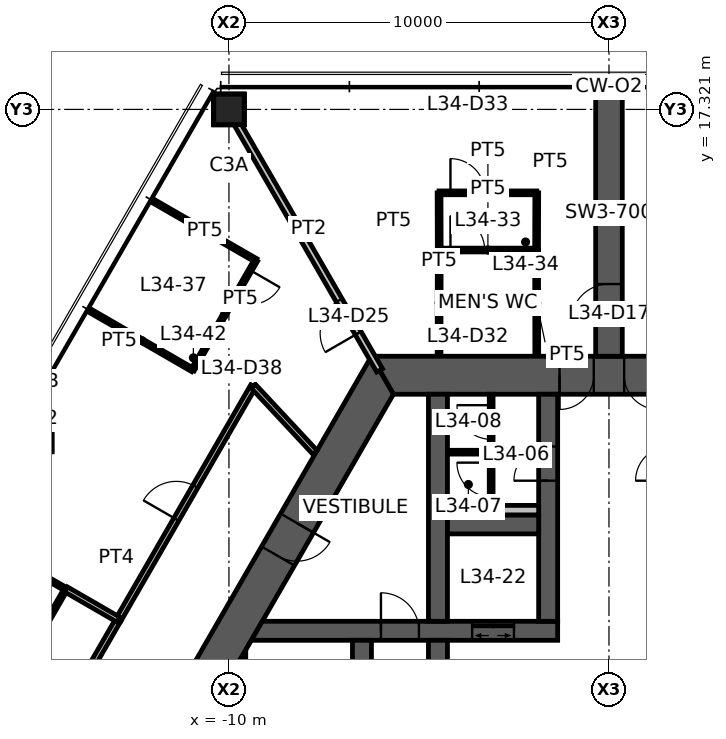
"""IFC4 building model, lengths in metres.
Left out: names, types, materials, properties, quantities, classifications, styles, units other than length and angle.
Written with IfcOpenShell. Run it as: python <this file> out.ifc"""

import sys

from ifc_helpers import new_model, si_unit, direction, frame, frame_2d, origin, origin_2d, place, context, subcontext, project, spatial, polyline, rectangle, hollow_rectangle, outline, extrude, element, fill, save


model = new_model("IFC4")
c1 = context("Model", 3, precision=1e-05, world=origin(), true_north=direction((0.0, 1.0)))
c2 = subcontext(c1, "Body", "Model", "MODEL_VIEW")
j1 = project(units=[si_unit("LENGTHUNIT", "METRE"), si_unit("PLANEANGLEUNIT", "RADIAN")], contexts=[c1])
p1 = place(None, origin())
s1 = spatial("IfcSite", under=j1, at=p1, CompositionType="ELEMENT")
p2 = place(p1, origin())
s2 = spatial("IfcBuilding", under=s1, at=p2, CompositionType="ELEMENT")
p3 = place(p2, frame((0.0, 0.0, 137.0)))
s3 = spatial("IfcBuildingStorey", under=s2, at=p3, CompositionType="ELEMENT", Elevation=137.0)
p4 = place(p3, frame((-10.0, 17.321, 0.0), z_axis=(0.0, 0.0, 1.0), x_axis=(1.0, 0.0, 0.0)))
e1 = element("IfcColumn", 1, at=p4, inside=s3, PredefinedType="COLUMN", context=c2, shape_type="SweptSolid", body=[
    extrude(hollow_rectangle(XDim=0.8, YDim=0.8, WallThickness=0.045, at=origin_2d()), origin(), (0.0, 0.0, 1.0), 3.9),
])
p5 = place(p3, frame((5.961, 10.325, 0.0), z_axis=(0.0, 0.0, 1.0), x_axis=(-1.0, 0.0, 0.0)))
e2 = element("IfcWall", 2, at=p5, inside=s3, PredefinedType="SHEAR", context=c2, shape_type="SweptSolid", body=[
    extrude(outline(polyline([(-0.289, -0.5), (4.661, -0.5), (5.561, -0.5), (6.361, -0.5), (7.261, -0.5), (12.211, -0.5), (11.634, 0.5), (7.261, 0.5), (6.361, 0.5), (5.561, 0.5), (4.661, 0.5), (0.289, 0.5), (-0.289, -0.5)])), origin(), (0.0, 0.0, 1.0), 3.9),
])
p6 = place(p5, frame((6.361, 0.0, 0.0)))
e3 = element("IfcOpeningElement", 3, at=p6, cuts=e2, PredefinedType="OPENING", context=c2, shape_type="SweptSolid", body=[
    extrude(rectangle(XDim=0.9, YDim=2.1, at=frame_2d((0.45, 1.05))), frame((0.0, 0.51, 0.0), z_axis=(0.0, -1.0, 0.0), x_axis=(1.0, 0.0, 0.0)), (0.0, 0.0, 1.0), 1.02),
])
p7 = place(p5, frame((4.661, 0.0, 0.0)))
e4 = element("IfcOpeningElement", 4, at=p7, cuts=e2, PredefinedType="OPENING", context=c2, shape_type="SweptSolid", body=[
    extrude(rectangle(XDim=0.9, YDim=2.1, at=frame_2d((0.45, 1.05))), frame((0.0, 0.51, 0.0), z_axis=(0.0, -1.0, 0.0), x_axis=(1.0, 0.0, 0.0)), (0.0, 0.0, 1.0), 1.02),
])
p8 = place(p3, frame((-5.961, 10.325, 0.0), z_axis=(0.0, 0.0, 1.0), x_axis=(-0.500004296715, -0.866022923061, 0.0)))
e5 = element("IfcWall", 5, at=p8, inside=s3, PredefinedType="SHEAR", context=c2, shape_type="SweptSolid", body=[
    extrude(outline(polyline([(-0.289, -0.5), (4.494, -0.5), (5.494, -0.5), (12.211, -0.5), (11.634, 0.5), (5.494, 0.5), (4.494, 0.5), (0.289, 0.5), (-0.289, -0.5)])), origin(), (0.0, 0.0, 1.0), 3.9),
])
p9 = place(p8, frame((4.494, 0.0, 0.0)))
e6 = element("IfcOpeningElement", 6, at=p9, cuts=e5, PredefinedType="OPENING", context=c2, shape_type="SweptSolid", body=[
    extrude(rectangle(XDim=1.0, YDim=2.1, at=frame_2d((0.5, 1.05))), frame((0.0, 0.51, 0.0), z_axis=(0.0, -1.0, 0.0), x_axis=(1.0, 0.0, 0.0)), (0.0, 0.0, 1.0), 1.02),
])
p10 = place(p3, frame((0.0, 10.825, 0.0), z_axis=(0.0, 0.0, 1.0), x_axis=(0.0, 1.0, 0.0)))
e7 = element("IfcWall", 7, at=p10, inside=s3, PredefinedType="SHEAR", context=c2, shape_type="SweptSolid", body=[
    extrude(rectangle(XDim=6.946, YDim=0.7, at=frame_2d((3.473, 0.0))), origin(), (0.0, 0.0, 1.0), 3.9),
])
p11 = place(p10, frame((0.9, 0.0, 0.0)))
e8 = element("IfcOpeningElement", 8, at=p11, cuts=e7, PredefinedType="OPENING", context=c2, shape_type="SweptSolid", body=[
    extrude(rectangle(XDim=1.0, YDim=2.1, at=frame_2d((0.5, 1.05))), frame((0.0, 0.36, 0.0), z_axis=(0.0, -1.0, 0.0), x_axis=(1.0, 0.0, 0.0)), (0.0, 0.0, 1.0), 0.72),
])
p12 = place(p3, frame((-9.266, 3.6, 0.0), z_axis=(0.0, 0.0, 1.0), x_axis=(1.0, 0.0, 0.0)))
e9 = element("IfcWall", 9, at=p12, inside=s3, PredefinedType="SHEAR", context=c2, shape_type="SweptSolid", body=[
    extrude(outline(polyline([(-0.144, -0.25), (3.266, -0.25), (4.266, -0.25), (5.667, -0.25), (6.767, -0.25), (7.916, -0.25), (7.916, 0.25), (6.767, 0.25), (5.667, 0.25), (4.266, 0.25), (3.266, 0.25), (0.144, 0.25), (-0.144, -0.25)])), origin(), (0.0, 0.0, 1.0), 3.9),
])
p13 = place(p12, frame((3.266, 0.0, 0.0)))
e10 = element("IfcOpeningElement", 10, at=p13, cuts=e9, PredefinedType="OPENING", context=c2, shape_type="SweptSolid", body=[
    extrude(rectangle(XDim=1.0, YDim=2.1, at=frame_2d((0.5, 1.05))), frame((0.0, 0.26, 0.0), z_axis=(0.0, -1.0, 0.0), x_axis=(1.0, 0.0, 0.0)), (0.0, 0.0, 1.0), 0.52),
])
p14 = place(p12, frame((5.667, 0.0, 0.0)))
e11 = element("IfcOpeningElement", 11, at=p14, cuts=e9, PredefinedType="OPENING", context=c2, shape_type="SweptSolid", body=[
    extrude(rectangle(XDim=1.1, YDim=2.1, at=frame_2d((0.55, 1.05))), frame((0.0, 0.26, 0.0), z_axis=(0.0, -1.0, 0.0), x_axis=(1.0, 0.0, 0.0)), (0.0, 0.0, 1.0), 0.52),
])
p15 = place(p3, frame((-1.6, 3.85, 0.0), z_axis=(0.0, 0.0, 1.0), x_axis=(0.0, 1.0, 0.0)))
e12 = element("IfcWall", 12, at=p15, inside=s3, PredefinedType="SHEAR", context=c2, shape_type="SweptSolid", body=[
    extrude(rectangle(XDim=5.975, YDim=0.5, at=frame_2d((2.987, 0.0))), origin(), (0.0, 0.0, 1.0), 3.9),
])
p16 = place(p15, frame((3.7, 0.0, 0.0)))
e13 = element("IfcOpeningElement", 13, at=p16, cuts=e12, PredefinedType="OPENING", context=c2, shape_type="SweptSolid", body=[
    extrude(rectangle(XDim=0.9, YDim=2.1, at=frame_2d((0.45, 1.05))), frame((0.0, 0.26, 0.0), z_axis=(0.0, -1.0, 0.0), x_axis=(1.0, 0.0, 0.0)), (0.0, 0.0, 1.0), 0.52),
])
p17 = place(p3, frame((-4.5, -3.35, 0.0), z_axis=(0.0, 0.0, 1.0), x_axis=(0.0, 1.0, 0.0)))
e14 = element("IfcWall", 14, at=p17, inside=s3, PredefinedType="SHEAR", context=c2, shape_type="SweptSolid", body=[
    extrude(rectangle(XDim=6.7, YDim=0.5, at=frame_2d((3.35, 0.0))), origin(), (0.0, 0.0, 1.0), 3.9),
])
p18 = place(p17, frame((2.85, 0.0, 0.0)))
e15 = element("IfcOpeningElement", 15, at=p18, cuts=e14, PredefinedType="OPENING", context=c2, shape_type="SweptSolid", body=[
    extrude(rectangle(XDim=1.0, YDim=2.1, at=frame_2d((0.5, 1.05))), frame((0.0, 0.26, 0.0), z_axis=(0.0, -1.0, 0.0), x_axis=(1.0, 0.0, 0.0)), (0.0, 0.0, 1.0), 0.52),
])
p19 = place(p3, frame((-6.5, -3.35, 0.0), z_axis=(0.0, 0.0, 1.0), x_axis=(0.0, 1.0, 0.0)))
e16 = element("IfcWall", 16, at=p19, inside=s3, PredefinedType="SHEAR", context=c2, shape_type="SweptSolid", body=[
    extrude(rectangle(XDim=6.7, YDim=0.5, at=frame_2d((3.35, 0.0))), origin(), (0.0, 0.0, 1.0), 3.9),
])
p20 = place(p19, frame((0.1, 0.0, 0.0)))
e17 = element("IfcOpeningElement", 17, at=p20, cuts=e16, PredefinedType="OPENING", context=c2, shape_type="SweptSolid", body=[
    extrude(rectangle(XDim=1.0, YDim=2.1, at=frame_2d((0.5, 1.05))), frame((0.0, 0.26, 0.0), z_axis=(0.0, -1.0, 0.0), x_axis=(1.0, 0.0, 0.0)), (0.0, 0.0, 1.0), 0.52),
])
p21 = place(p3, frame((-4.5, 3.85, 0.0), z_axis=(0.0, 0.0, 1.0), x_axis=(0.0, 1.0, 0.0)))
e18 = element("IfcWall", 18, at=p21, inside=s3, PredefinedType="SHEAR", context=c2, shape_type="SweptSolid", body=[
    extrude(rectangle(XDim=5.975, YDim=0.5, at=frame_2d((2.987, 0.0))), origin(), (0.0, 0.0, 1.0), 3.9),
])
p22 = place(p3, frame((-4.25, 6.4, 0.0), z_axis=(0.0, 0.0, 1.0), x_axis=(1.0, 0.0, 0.0)))
e19 = element("IfcWall", 19, at=p22, inside=s3, PredefinedType="SHEAR", context=c2, shape_type="SweptSolid", body=[
    extrude(rectangle(XDim=2.4, YDim=0.5, at=frame_2d((1.2, 0.0))), origin(), (0.0, 0.0, 1.0), 3.9),
])
p23 = place(p3, frame((-9.808, -2.662, 0.0), z_axis=(0.0, 0.0, 1.0), x_axis=(0.0, 1.0, 0.0)))
e20 = element("IfcWall", 20, at=p23, inside=s3, PredefinedType="SHEAR", context=c2, shape_type="SweptSolid", body=[
    extrude(outline(polyline([(-0.433, -0.25), (5.758, -0.25), (4.892, 0.25), (0.433, 0.25), (-0.433, -0.25)])), origin(), (0.0, 0.0, 1.0), 3.9),
])
p24 = place(p3, frame((-4.25, 6.775, 0.0), z_axis=(0.0, 0.0, 1.0), x_axis=(1.0, 0.0, 0.0)))
e21 = element("IfcWall", 21, at=p24, inside=s3, PredefinedType="PLUMBINGWALL", context=c2, shape_type="SweptSolid", body=[
    extrude(rectangle(XDim=2.4, YDim=0.25, at=frame_2d((1.2, 0.0))), origin(), (0.0, 0.0, 1.0), 3.9),
])
p25 = place(p3, frame((-3.1, 6.65, 0.0), z_axis=(0.0, 0.0, 1.0), x_axis=(0.0, 1.0, 0.0)))
e22 = element("IfcWall", 22, at=p25, inside=s3, PredefinedType="PARTITIONING", context=c2, shape_type="SweptSolid", body=[
    extrude(rectangle(XDim=3.175, YDim=0.1, at=frame_2d((1.587, 0.0))), origin(), (0.0, 0.0, 1.0), 2.95),
])
p26 = place(p25, frame((0.475, 0.0, 0.0)))
e23 = element("IfcOpeningElement", 23, at=p26, cuts=e22, PredefinedType="OPENING", context=c2, shape_type="SweptSolid", body=[
    extrude(rectangle(XDim=0.9, YDim=2.1, at=frame_2d((0.45, 1.05))), frame((0.0, 0.06, 0.0), z_axis=(0.0, -1.0, 0.0), x_axis=(1.0, 0.0, 0.0)), (0.0, 0.0, 1.0), 0.12),
])
p27 = place(p25, frame((1.988, 0.0, 0.0)))
e24 = element("IfcOpeningElement", 24, at=p27, cuts=e22, PredefinedType="OPENING", context=c2, shape_type="SweptSolid", body=[
    extrude(rectangle(XDim=0.9, YDim=2.1, at=frame_2d((0.45, 1.05))), frame((0.0, 0.06, 0.0), z_axis=(0.0, -1.0, 0.0), x_axis=(1.0, 0.0, 0.0)), (0.0, 0.0, 1.0), 0.12),
])
p28 = place(p3, frame((-3.15, 8.3, 0.0), z_axis=(0.0, 0.0, 1.0), x_axis=(-1.0, 0.0, 0.0)))
e25 = element("IfcWall", 25, at=p28, inside=s3, PredefinedType="PARTITIONING", context=c2, shape_type="SweptSolid", body=[
    extrude(rectangle(XDim=1.1, YDim=0.1, at=frame_2d((0.55, 0.0))), origin(), (0.0, 0.0, 1.0), 2.95),
])
p29 = place(p3, frame((-6.035, 10.453, 0.0), z_axis=(0.0, 0.0, 1.0), x_axis=(-0.499989830942, 0.866031274813, 0.0)))
e26 = element("IfcWall", 26, at=p29, inside=s3, PredefinedType="PARTITIONING", context=c2, shape_type="SweptSolid", body=[
    extrude(rectangle(XDim=7.93, YDim=0.175, at=frame_2d((3.965, 0.0))), origin(), (0.0, 0.0, 1.0), 3.05),
])
p30 = place(p29, frame((1.13, 0.0, 0.0)))
e27 = element("IfcOpeningElement", 27, at=p30, cuts=e26, PredefinedType="OPENING", context=c2, shape_type="SweptSolid", body=[
    extrude(rectangle(XDim=1.0, YDim=2.1, at=frame_2d((0.5, 1.05))), frame((0.0, 0.098, 0.0), z_axis=(0.0, -1.0, 0.0), x_axis=(1.0, 0.0, 0.0)), (0.0, 0.0, 1.0), 0.195),
])
p31 = place(p3, frame((-4.471, 13.62, 0.0), z_axis=(0.0, 0.0, 1.0), x_axis=(1.0, 0.0, 0.0)))
e28 = element("IfcWall", 28, at=p31, inside=s3, PredefinedType="PARTITIONING", context=c2, shape_type="SweptSolid", body=[
    extrude(rectangle(XDim=2.571, YDim=0.1, at=frame_2d((1.286, 0.0))), origin(), (0.0, 0.0, 1.0), 2.95),
])
p32 = place(p31, frame((0.3, 0.0, 0.0)))
e29 = element("IfcOpeningElement", 29, at=p32, cuts=e28, PredefinedType="OPENING", context=c2, shape_type="SweptSolid", body=[
    extrude(rectangle(XDim=0.9, YDim=2.1, at=frame_2d((0.45, 1.05))), frame((0.0, 0.06, 0.0), z_axis=(0.0, -1.0, 0.0), x_axis=(1.0, 0.0, 0.0)), (0.0, 0.0, 1.0), 0.12),
])
for number, where, z_axis, x_axis in (
    (30, (-4.471, 10.845, 0.0), (0.0, 0.0, 1.0), (0.002, 1.0, 0.0)),
    (31, (-1.905, 13.625, 0.0), (0.0, 0.0, 1.0), (0.002, -1.0, 0.0)),
):
    element("IfcWall", number, at=place(p3, frame(where, z_axis=z_axis, x_axis=x_axis)), inside=s3, PredefinedType="PARTITIONING", context=c2, shape_type="SweptSolid", body=[
        extrude(rectangle(XDim=2.78, YDim=0.1, at=frame_2d((1.39, 0.0))), origin(), (0.0, 0.0, 1.0), 2.95),
    ])
p33 = place(p3, frame((-4.471, 15.125, 0.0), z_axis=(0.0, 0.0, 1.0), x_axis=(1.0, 0.0, 0.0)))
e32 = element("IfcWall", 32, at=p33, inside=s3, PredefinedType="PARTITIONING", context=c2, shape_type="SweptSolid", body=[
    extrude(rectangle(XDim=2.571, YDim=0.1, at=frame_2d((1.286, 0.0))), origin(), (0.0, 0.0, 1.0), 2.95),
])
p34 = place(p33, frame((0.3, 0.0, 0.0)))
e33 = element("IfcOpeningElement", 33, at=p34, cuts=e32, PredefinedType="OPENING", context=c2, shape_type="SweptSolid", body=[
    extrude(rectangle(XDim=0.9, YDim=2.1, at=frame_2d((0.45, 1.05))), frame((0.0, 0.06, 0.0), z_axis=(0.0, -1.0, 0.0), x_axis=(1.0, 0.0, 0.0)), (0.0, 0.0, 1.0), 0.12),
])
for number, where, z_axis, x_axis in (
    (34, (-4.466, 13.625, 0.0), (0.0, 0.0, 1.0), (-0.003, 1.0, 0.0)),
    (35, (-1.9, 15.125, 0.0), (0.0, 0.0, 1.0), (-0.003, -1.0, 0.0)),
):
    element("IfcWall", number, at=place(p3, frame(where, z_axis=z_axis, x_axis=x_axis)), inside=s3, PredefinedType="PARTITIONING", context=c2, shape_type="SweptSolid", body=[
        extrude(rectangle(XDim=1.5, YDim=0.1, at=frame_2d((0.75, 0.0))), origin(), (0.0, 0.0, 1.0), 2.95),
    ])
p35 = place(p3, frame((-15.156, 0.0, 0.0), z_axis=(0.0, 0.0, 1.0), x_axis=(0.500014848696, 0.866016830716, 0.0)))
e36 = element("IfcWall", 36, at=p35, inside=s3, PredefinedType="PARTITIONING", context=c2, shape_type="SweptSolid", body=[
    extrude(rectangle(XDim=4.505, YDim=0.15, at=frame_2d((2.252, 0.0))), origin(), (0.0, 0.0, 1.0), 2.95),
])
p36 = place(p3, frame((-12.908, 3.893, 0.0), z_axis=(0.0, 0.0, 1.0), x_axis=(0.500006411147, 0.866021702275, 0.0)))
e37 = element("IfcWall", 37, at=p36, inside=s3, PredefinedType="PARTITIONING", context=c2, shape_type="SweptSolid", body=[
    extrude(rectangle(XDim=7.095, YDim=0.15, at=frame_2d((3.548, 0.0))), origin(), (0.0, 0.0, 1.0), 2.95),
])
p37 = place(p36, frame((3.047, 0.0, 0.0)))
e38 = element("IfcOpeningElement", 38, at=p37, cuts=e37, PredefinedType="OPENING", context=c2, shape_type="SweptSolid", body=[
    extrude(rectangle(XDim=1.0, YDim=2.1, at=frame_2d((0.5, 1.05))), frame((0.0, 0.085, 0.0), z_axis=(0.0, -1.0, 0.0), x_axis=(1.0, 0.0, 0.0)), (0.0, 0.0, 1.0), 0.17),
])
p38 = place(p3, frame((-9.36, 10.038, 0.0), z_axis=(0.0, 0.0, 1.0), x_axis=(0.681997114248, -0.731354863358, 0.0)))
e39 = element("IfcWall", 39, at=p38, inside=s3, PredefinedType="PARTITIONING", context=c2, shape_type="SweptSolid", body=[
    extrude(outline(polyline([(0.0, -0.075), (2.384, -0.075), (2.384, 0.0), (2.382, 0.075), (0.0, 0.075), (0.0, -0.075)])), origin(), (0.0, 0.0, 1.0), 2.95),
])
p39 = place(p3, frame((-11.98, 14.902, 0.0), z_axis=(0.0, 0.0, 1.0), x_axis=(0.866042875753, -0.499969736442, 0.0)))
e40 = element("IfcWall", 40, at=p39, inside=s3, PredefinedType="PARTITIONING", context=c2, shape_type="SweptSolid", body=[
    extrude(rectangle(XDim=3.105, YDim=0.1, at=frame_2d((1.553, 0.0))), origin(), (0.0, 0.0, 1.0), 2.95),
])
p40 = place(p3, frame((-10.956, 10.465, 0.0), z_axis=(0.0, 0.0, 1.0), x_axis=(-0.866044340336, 0.499967199496, 0.0)))
e41 = element("IfcWall", 41, at=p40, inside=s3, PredefinedType="PARTITIONING", context=c2, shape_type="SweptSolid", body=[
    extrude(rectangle(XDim=3.08, YDim=0.1, at=frame_2d((1.54, 0.0))), origin(), (0.0, 0.0, 1.0), 2.95),
])
p41 = place(p3, frame((-9.291, 13.349, 0.0), z_axis=(0.0, 0.0, 1.0), x_axis=(-0.500033344505, -0.86600615147, 0.0)))
e42 = element("IfcWall", 42, at=p41, inside=s3, PredefinedType="PARTITIONING", context=c2, shape_type="SweptSolid", body=[
    extrude(rectangle(XDim=3.331, YDim=0.1, at=frame_2d((1.666, 0.0))), origin(), (0.0, 0.0, 1.0), 2.95),
])
p42 = place(p41, frame((0.3, 0.0, 0.0)))
e43 = element("IfcOpeningElement", 43, at=p42, cuts=e42, PredefinedType="OPENING", context=c2, shape_type="SweptSolid", body=[
    extrude(rectangle(XDim=0.9, YDim=2.1, at=frame_2d((0.45, 1.05))), frame((0.0, 0.06, 0.0), z_axis=(0.0, -1.0, 0.0), x_axis=(1.0, 0.0, 0.0)), (0.0, 0.0, 1.0), 0.12),
])
p43 = place(p3, frame((-14.291, 4.698, 0.0), z_axis=(0.0, 0.0, 1.0), x_axis=(-0.498780940327, -0.866728085138, 0.0)))
e44 = element("IfcWall", 44, at=p43, inside=s3, PredefinedType="PARTITIONING", context=c2, shape_type="SweptSolid", body=[
    extrude(rectangle(XDim=3.331, YDim=0.1, at=frame_2d((1.666, 0.0))), origin(), (0.0, 0.0, 1.0), 2.95),
])
p44 = place(p43, frame((2.131, 0.0, 0.0)))
e45 = element("IfcOpeningElement", 45, at=p44, cuts=e44, PredefinedType="OPENING", context=c2, shape_type="SweptSolid", body=[
    extrude(rectangle(XDim=0.9, YDim=2.1, at=frame_2d((0.45, 1.05))), frame((0.0, 0.06, 0.0), z_axis=(0.0, -1.0, 0.0), x_axis=(1.0, 0.0, 0.0)), (0.0, 0.0, 1.0), 0.12),
])
p45 = place(p3, frame((-16.976, 6.248, 0.0), z_axis=(0.0, 0.0, 1.0), x_axis=(0.865232439327, -0.501370946442, 0.0)))
e46 = element("IfcWall", 46, at=p45, inside=s3, PredefinedType="PARTITIONING", context=c2, shape_type="SweptSolid", body=[
    extrude(rectangle(XDim=3.105, YDim=0.1, at=frame_2d((1.553, 0.0))), origin(), (0.0, 0.0, 1.0), 2.95),
])
p46 = place(p3, frame((-14.289, 4.691, 0.0), z_axis=(0.0, 0.0, 1.0), x_axis=(0.865925490132, -0.500173015605, 0.0)))
e47 = element("IfcWall", 47, at=p46, inside=s3, PredefinedType="PARTITIONING", context=c2, shape_type="SweptSolid", body=[
    extrude(rectangle(XDim=1.595, YDim=0.15, at=frame_2d((0.797, 0.0))), origin(), (0.0, 0.0, 1.0), 2.95),
])
p47 = place(p3, frame((0.0, 17.771, 0.0), z_axis=(0.0, 0.0, 1.0), x_axis=(0.0, 1.0, 0.0)))
e48 = element("IfcWall", 48, at=p47, inside=s3, PredefinedType="PARTITIONING", context=c2, shape_type="SweptSolid", body=[
    extrude(rectangle(XDim=0.08, YDim=0.175, at=frame_2d((0.04, 0.0))), origin(), (0.0, 0.0, 1.0), 3.9),
])
p48 = place(p6, origin())
e49 = element("IfcDoor", 49, at=p48, inside=s3, OperationType="SINGLE_SWING_RIGHT", PredefinedType="DOOR", context=c2, shape_type="SweptSolid", body=[
    extrude(rectangle(XDim=0.9, YDim=2.1, at=frame_2d((0.45, 1.05))), frame((0.0, 0.025, 0.0), z_axis=(0.0, -1.0, 0.0), x_axis=(1.0, 0.0, 0.0)), (0.0, 0.0, 1.0), 0.05),
])
fill(e3, e49)
p49 = place(p7, origin())
e50 = element("IfcDoor", 50, at=p49, inside=s3, OperationType="SINGLE_SWING_LEFT", PredefinedType="DOOR", context=c2, shape_type="SweptSolid", body=[
    extrude(rectangle(XDim=0.9, YDim=2.1, at=frame_2d((0.45, 1.05))), frame((0.0, 0.025, 0.0), z_axis=(0.0, -1.0, 0.0), x_axis=(1.0, 0.0, 0.0)), (0.0, 0.0, 1.0), 0.05),
])
fill(e4, e50)
p50 = place(p9, origin())
e51 = element("IfcDoor", 51, at=p50, inside=s3, OperationType="SINGLE_SWING_LEFT", PredefinedType="DOOR", context=c2, shape_type="SweptSolid", body=[
    extrude(rectangle(XDim=1.0, YDim=2.1, at=frame_2d((0.5, 1.05))), frame((0.0, 0.025, 0.0), z_axis=(0.0, -1.0, 0.0), x_axis=(1.0, 0.0, 0.0)), (0.0, 0.0, 1.0), 0.05),
])
fill(e6, e51)
p51 = place(p13, origin())
e52 = element("IfcDoor", 52, at=p51, inside=s3, OperationType="SINGLE_SWING_LEFT", PredefinedType="DOOR", context=c2, shape_type="SweptSolid", body=[
    extrude(rectangle(XDim=1.0, YDim=2.1, at=frame_2d((0.5, 1.05))), frame((0.0, 0.025, 0.0), z_axis=(0.0, -1.0, 0.0), x_axis=(1.0, 0.0, 0.0)), (0.0, 0.0, 1.0), 0.05),
])
fill(e10, e52)
p52 = place(p16, origin())
e53 = element("IfcDoor", 53, at=p52, inside=s3, OperationType="SINGLE_SWING_LEFT", PredefinedType="DOOR", context=c2, shape_type="SweptSolid", body=[
    extrude(rectangle(XDim=0.9, YDim=2.1, at=frame_2d((0.45, 1.05))), frame((0.0, 0.025, 0.0), z_axis=(0.0, -1.0, 0.0), x_axis=(1.0, 0.0, 0.0)), (0.0, 0.0, 1.0), 0.05),
])
fill(e13, e53)
p53 = place(p11, origin())
e54 = element("IfcDoor", 54, at=p53, inside=s3, OperationType="SINGLE_SWING_LEFT", PredefinedType="DOOR", context=c2, shape_type="SweptSolid", body=[
    extrude(rectangle(XDim=1.0, YDim=2.1, at=frame_2d((0.5, 1.05))), frame((0.0, 0.025, 0.0), z_axis=(0.0, -1.0, 0.0), x_axis=(1.0, 0.0, 0.0)), (0.0, 0.0, 1.0), 0.05),
])
fill(e8, e54)
p54 = place(p26, origin())
e55 = element("IfcDoor", 55, at=p54, inside=s3, OperationType="SINGLE_SWING_RIGHT", PredefinedType="DOOR", context=c2, shape_type="SweptSolid", body=[
    extrude(rectangle(XDim=0.9, YDim=2.1, at=frame_2d((0.45, 1.05))), frame((0.0, 0.025, 0.0), z_axis=(0.0, -1.0, 0.0), x_axis=(1.0, 0.0, 0.0)), (0.0, 0.0, 1.0), 0.05),
])
fill(e23, e55)
p55 = place(p27, origin())
e56 = element("IfcDoor", 56, at=p55, inside=s3, OperationType="SINGLE_SWING_RIGHT", PredefinedType="DOOR", context=c2, shape_type="SweptSolid", body=[
    extrude(rectangle(XDim=0.9, YDim=2.1, at=frame_2d((0.45, 1.05))), frame((0.0, 0.025, 0.0), z_axis=(0.0, -1.0, 0.0), x_axis=(1.0, 0.0, 0.0)), (0.0, 0.0, 1.0), 0.05),
])
fill(e24, e56)
p56 = place(p30, origin())
e57 = element("IfcDoor", 57, at=p56, inside=s3, OperationType="SINGLE_SWING_LEFT", PredefinedType="DOOR", context=c2, shape_type="SweptSolid", body=[
    extrude(rectangle(XDim=1.0, YDim=2.1, at=frame_2d((0.5, 1.05))), frame((0.0, 0.025, 0.0), z_axis=(0.0, -1.0, 0.0), x_axis=(1.0, 0.0, 0.0)), (0.0, 0.0, 1.0), 0.05),
])
fill(e27, e57)
p57 = place(p32, origin())
e58 = element("IfcDoor", 58, at=p57, inside=s3, OperationType="SINGLE_SWING_LEFT", PredefinedType="DOOR", context=c2, shape_type="SweptSolid", body=[
    extrude(rectangle(XDim=0.9, YDim=2.1, at=frame_2d((0.45, 1.05))), frame((0.0, 0.025, 0.0), z_axis=(0.0, -1.0, 0.0), x_axis=(1.0, 0.0, 0.0)), (0.0, 0.0, 1.0), 0.05),
])
fill(e29, e58)
p58 = place(p34, origin())
e59 = element("IfcDoor", 59, at=p58, inside=s3, OperationType="SINGLE_SWING_LEFT", PredefinedType="DOOR", context=c2, shape_type="SweptSolid", body=[
    extrude(rectangle(XDim=0.9, YDim=2.1, at=frame_2d((0.45, 1.05))), frame((0.0, 0.025, 0.0), z_axis=(0.0, -1.0, 0.0), x_axis=(1.0, 0.0, 0.0)), (0.0, 0.0, 1.0), 0.05),
])
fill(e33, e59)
p59 = place(p37, origin())
e60 = element("IfcDoor", 60, at=p59, inside=s3, OperationType="SINGLE_SWING_LEFT", PredefinedType="DOOR", context=c2, shape_type="SweptSolid", body=[
    extrude(rectangle(XDim=1.0, YDim=2.1, at=frame_2d((0.5, 1.05))), frame((0.0, 0.025, 0.0), z_axis=(0.0, -1.0, 0.0), x_axis=(1.0, 0.0, 0.0)), (0.0, 0.0, 1.0), 0.05),
])
fill(e38, e60)
p60 = place(p42, origin())
e61 = element("IfcDoor", 61, at=p60, inside=s3, OperationType="SINGLE_SWING_LEFT", PredefinedType="DOOR", context=c2, shape_type="SweptSolid", body=[
    extrude(rectangle(XDim=0.9, YDim=2.1, at=frame_2d((0.45, 1.05))), frame((0.0, 0.025, 0.0), z_axis=(0.0, -1.0, 0.0), x_axis=(1.0, 0.0, 0.0)), (0.0, 0.0, 1.0), 0.05),
])
fill(e43, e61)
p61 = place(p14, origin())
e62 = element("IfcDoor", 62, at=p61, inside=s3, OperationType="DOUBLE_DOOR_SLIDING", PredefinedType="DOOR", context=c2, shape_type="SweptSolid", body=[
    extrude(rectangle(XDim=1.1, YDim=2.1, at=frame_2d((0.55, 1.05))), frame((0.0, 0.025, 0.0), z_axis=(0.0, -1.0, 0.0), x_axis=(1.0, 0.0, 0.0)), (0.0, 0.0, 1.0), 0.05),
])
fill(e11, e62)
save(model, sys.argv[1])
